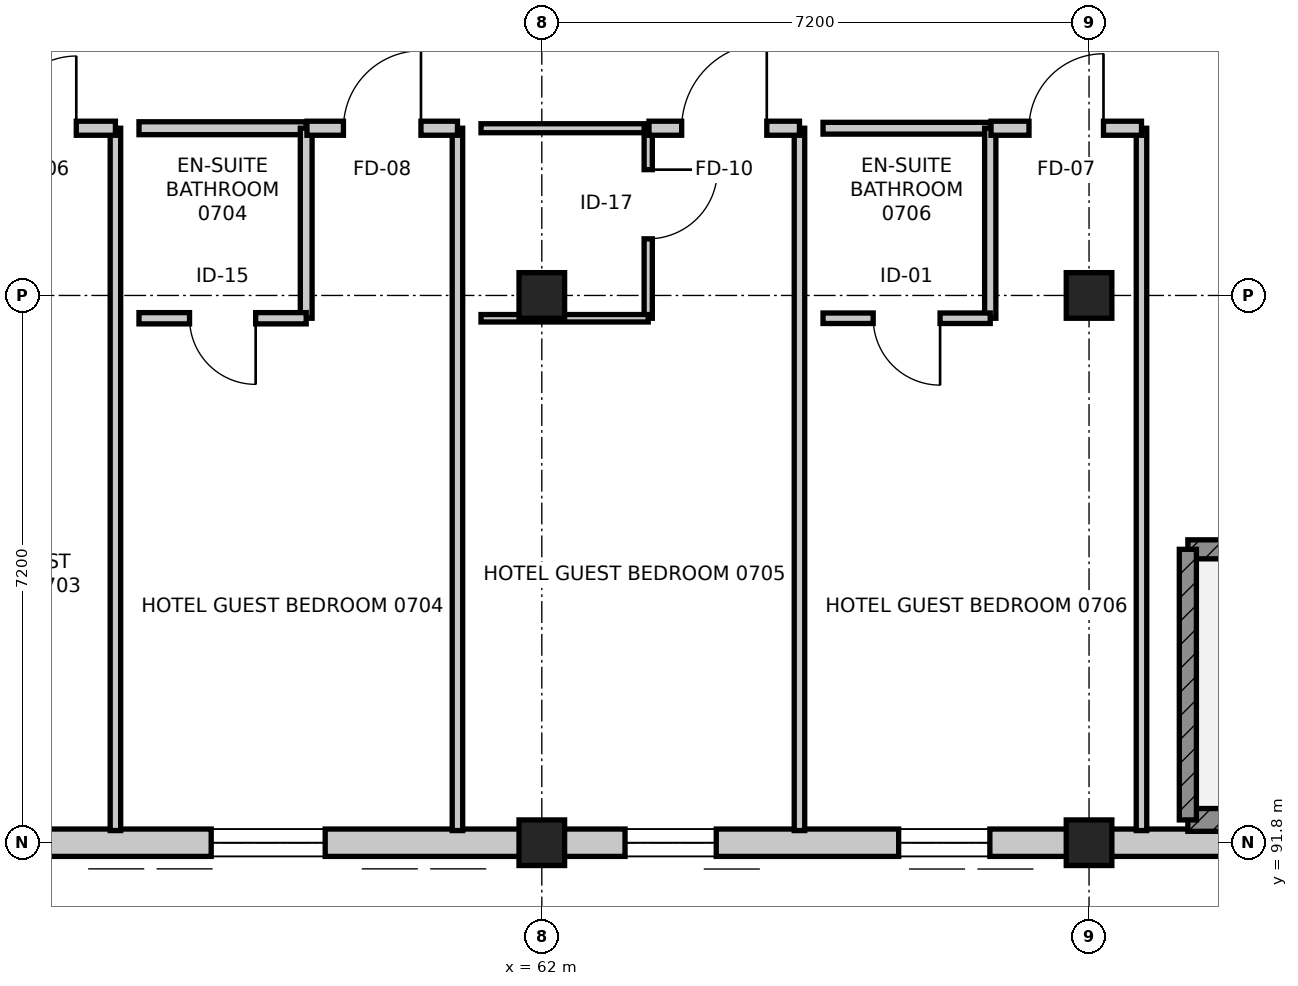
"""IFC4 building model, lengths in metres.
Left out: names, types, materials, properties, quantities, classifications, styles, units other than length and angle.
Written with IfcOpenShell. Run it as: python <this file> out.ifc"""

import sys

from ifc_helpers import new_model, si_unit, direction, frame, frame_2d, origin, origin_2d, place, context, subcontext, project, spatial, rectangle, extrude, element, fill, save


model = new_model("IFC4")
c1 = context("Model", 3, precision=1e-05, world=origin(), true_north=direction((0.0, 1.0)))
c2 = subcontext(c1, "Body", "Model", "MODEL_VIEW")
j1 = project(units=[si_unit("LENGTHUNIT", "METRE"), si_unit("PLANEANGLEUNIT", "RADIAN")], contexts=[c1])
p1 = place(None, origin())
s1 = spatial("IfcSite", under=j1, at=p1, CompositionType="ELEMENT")
p2 = place(p1, origin())
s2 = spatial("IfcBuilding", under=s1, at=p2, CompositionType="ELEMENT")
p3 = place(p2, frame((0.0, 0.0, 30.0)))
s3 = spatial("IfcBuildingStorey", under=s2, at=p3, CompositionType="ELEMENT", Elevation=30.0)
for number, where, z_axis, x_axis in (
    (1, (62.0, 91.8, 0.0), (0.0, 0.0, 1.0), (1.0, 0.0, 0.0)),
    (2, (62.0, 99.0, 0.0), (0.0, 0.0, 1.0), (1.0, 0.0, 0.0)),
    (3, (69.2, 91.8, 0.0), (0.0, 0.0, 1.0), (1.0, 0.0, 0.0)),
    (4, (69.2, 99.0, 0.0), (0.0, 0.0, 1.0), (1.0, 0.0, 0.0)),
):
    element("IfcColumn", number, at=place(p3, frame(where, z_axis=z_axis, x_axis=x_axis)), inside=s3, PredefinedType="COLUMN", context=c2, shape_type="SweptSolid", body=[
        extrude(rectangle(XDim=0.6, YDim=0.6, at=origin_2d()), origin(), (0.0, 0.0, 1.0), 3.6),
    ])
p4 = place(p3, frame((76.4, 91.8, 0.0), z_axis=(0.0, 0.0, 1.0), x_axis=(-1.0, 0.0, 0.0)))
e5 = element("IfcWall", 5, at=p4, inside=s3, PredefinedType="STANDARD", context=c2, shape_type="SweptSolid", body=[
    extrude(rectangle(XDim=7.2, YDim=0.36, at=frame_2d((3.6, 0.0))), origin(), (0.0, 0.0, 1.0), 3.36),
])
p5 = place(p4, frame((2.8, 0.0, 0.9)))
e6 = element("IfcOpeningElement", 6, at=p5, cuts=e5, PredefinedType="OPENING", context=c2, shape_type="SweptSolid", body=[
    extrude(rectangle(XDim=1.6, YDim=1.95, at=frame_2d((0.8, 0.975))), frame((0.0, 0.19, 0.0), z_axis=(0.0, -1.0, 0.0), x_axis=(1.0, 0.0, 0.0)), (0.0, 0.0, 1.0), 0.38),
])
p6 = place(p3, frame((69.2, 91.8, 0.0), z_axis=(0.0, 0.0, 1.0), x_axis=(-1.0, 0.0, 0.0)))
e7 = element("IfcWall", 7, at=p6, inside=s3, PredefinedType="STANDARD", context=c2, shape_type="SweptSolid", body=[
    extrude(rectangle(XDim=7.2, YDim=0.36, at=frame_2d((3.6, 0.0))), origin(), (0.0, 0.0, 1.0), 2.745),
])
p7 = place(p6, frame((1.305, 0.0, 0.75)))
e8 = element("IfcOpeningElement", 8, at=p7, cuts=e7, PredefinedType="OPENING", context=c2, shape_type="SweptSolid", body=[
    extrude(rectangle(XDim=1.2, YDim=1.5, at=frame_2d((0.6, 0.75))), frame((0.0, 0.19, 0.0), z_axis=(0.0, -1.0, 0.0), x_axis=(1.0, 0.0, 0.0)), (0.0, 0.0, 1.0), 0.38),
])
p8 = place(p6, frame((4.905, 0.0, 0.75)))
e9 = element("IfcOpeningElement", 9, at=p8, cuts=e7, PredefinedType="OPENING", context=c2, shape_type="SweptSolid", body=[
    extrude(rectangle(XDim=1.2, YDim=1.5, at=frame_2d((0.6, 0.75))), frame((0.0, 0.19, 0.0), z_axis=(0.0, -1.0, 0.0), x_axis=(1.0, 0.0, 0.0)), (0.0, 0.0, 1.0), 0.38),
])
p9 = place(p3, frame((62.0, 91.8, 0.0), z_axis=(0.0, 0.0, 1.0), x_axis=(-1.0, 0.0, 0.0)))
e10 = element("IfcWall", 10, at=p9, inside=s3, PredefinedType="STANDARD", context=c2, shape_type="SweptSolid", body=[
    extrude(rectangle(XDim=7.2, YDim=0.36, at=frame_2d((3.6, 0.0))), origin(), (0.0, 0.0, 1.0), 2.745),
])
p10 = place(p9, frame((2.85, 0.0, 0.75)))
e11 = element("IfcOpeningElement", 11, at=p10, cuts=e10, PredefinedType="OPENING", context=c2, shape_type="SweptSolid", body=[
    extrude(rectangle(XDim=1.5, YDim=1.5, at=frame_2d((0.75, 0.75))), frame((0.0, 0.19, 0.0), z_axis=(0.0, -1.0, 0.0), x_axis=(1.0, 0.0, 0.0)), (0.0, 0.0, 1.0), 0.38),
])
p11 = place(p3, frame((70.5, 92.1, 0.0), z_axis=(0.0, 0.0, 1.0), x_axis=(1.0, 0.0, 0.0)))
e12 = element("IfcWall", 12, at=p11, inside=s3, PredefinedType="SHEAR", context=c2, shape_type="SweptSolid", body=[
    extrude(rectangle(XDim=8.4, YDim=0.3, at=frame_2d((4.2, 0.0))), origin(), (0.0, 0.0, 1.0), 3.36),
])
p12 = place(p3, frame((78.9, 95.66, 0.0), z_axis=(0.0, 0.0, 1.0), x_axis=(-1.0, 0.0, 0.0)))
e13 = element("IfcWall", 13, at=p12, inside=s3, PredefinedType="SHEAR", context=c2, shape_type="SweptSolid", body=[
    extrude(rectangle(XDim=8.4, YDim=0.25, at=frame_2d((4.2, 0.0))), origin(), (0.0, 0.0, 1.0), 3.36),
])
p13 = place(p12, frame((0.39, 0.0, 0.0)))
e14 = element("IfcOpeningElement", 14, at=p13, cuts=e13, PredefinedType="OPENING", context=c2, shape_type="SweptSolid", body=[
    extrude(rectangle(XDim=1.1, YDim=2.1, at=frame_2d((0.55, 1.05))), frame((0.0, 0.135, 0.0), z_axis=(0.0, -1.0, 0.0), x_axis=(1.0, 0.0, 0.0)), (0.0, 0.0, 1.0), 0.27),
])
p14 = place(p3, frame((70.5, 95.66, 0.0), z_axis=(0.0, 0.0, 1.0), x_axis=(0.0, -1.0, 0.0)))
e15 = element("IfcWall", 15, at=p14, inside=s3, PredefinedType="SHEAR", context=c2, shape_type="SweptSolid", body=[
    extrude(rectangle(XDim=3.56, YDim=0.225, at=frame_2d((1.78, 0.0))), origin(), (0.0, 0.0, 1.0), 3.36),
])
p15 = place(p3, frame((56.39, 101.2, 0.0), z_axis=(0.0, 0.0, 1.0), x_axis=(0.0, -1.0, 0.0)))
e16 = element("IfcWall", 16, at=p15, inside=s3, PredefinedType="PARTITIONING", context=c2, shape_type="SweptSolid", body=[
    extrude(rectangle(XDim=9.24, YDim=0.138, at=frame_2d((4.62, 0.0))), origin(), (0.0, 0.0, 1.0), 2.745),
])
p16 = place(p3, frame((54.41, 101.2, 0.0), z_axis=(0.0, 0.0, 1.0), x_axis=(1.0, 0.0, 0.0)))
e17 = element("IfcWall", 17, at=p16, inside=s3, PredefinedType="PARTITIONING", context=c2, shape_type="SweptSolid", body=[
    extrude(rectangle(XDim=1.98, YDim=0.185, at=frame_2d((0.99, 0.0))), origin(), (0.0, 0.0, 1.0), 2.695),
])
p17 = place(p16, frame((0.515, 0.0, 0.0)))
e18 = element("IfcOpeningElement", 18, at=p17, cuts=e17, PredefinedType="OPENING", context=c2, shape_type="SweptSolid", body=[
    extrude(rectangle(XDim=0.95, YDim=2.1, at=frame_2d((0.475, 1.05))), frame((0.0, 0.103, 0.0), z_axis=(0.0, -1.0, 0.0), x_axis=(1.0, 0.0, 0.0)), (0.0, 0.0, 1.0), 0.205),
])
p18 = place(p3, frame((56.7, 101.2, 0.0), z_axis=(0.0, 0.0, 1.0), x_axis=(1.0, 0.0, 0.0)))
e19 = element("IfcWall", 19, at=p18, inside=s3, PredefinedType="PARTITIONING", context=c2, shape_type="SweptSolid", body=[
    extrude(rectangle(XDim=2.2, YDim=0.17, at=frame_2d((1.1, 0.0))), origin(), (0.0, 0.0, 1.0), 3.36),
])
p19 = place(p3, frame((58.9, 101.2, 0.0), z_axis=(0.0, 0.0, 1.0), x_axis=(0.0, -1.0, 0.0)))
e20 = element("IfcWall", 20, at=p19, inside=s3, PredefinedType="PARTITIONING", context=c2, shape_type="SweptSolid", body=[
    extrude(rectangle(XDim=2.5, YDim=0.155, at=frame_2d((1.25, 0.0))), origin(), (0.0, 0.0, 1.0), 2.745),
])
p20 = place(p3, frame((58.9, 98.7, 0.0), z_axis=(0.0, 0.0, 1.0), x_axis=(-1.0, 0.0, 0.0)))
e21 = element("IfcWall", 21, at=p20, inside=s3, PredefinedType="PARTITIONING", context=c2, shape_type="SweptSolid", body=[
    extrude(rectangle(XDim=2.2, YDim=0.148, at=frame_2d((1.1, 0.0))), origin(), (0.0, 0.0, 1.0), 3.36),
])
p21 = place(p20, frame((0.665, 0.0, 0.0)))
e22 = element("IfcOpeningElement", 22, at=p21, cuts=e21, PredefinedType="OPENING", context=c2, shape_type="SweptSolid", body=[
    extrude(rectangle(XDim=0.87, YDim=2.07, at=frame_2d((0.435, 1.035))), frame((0.0, 0.084, 0.0), z_axis=(0.0, -1.0, 0.0), x_axis=(1.0, 0.0, 0.0)), (0.0, 0.0, 1.0), 0.168),
])
p22 = place(p3, frame((60.89, 101.2, 0.0), z_axis=(0.0, 0.0, 1.0), x_axis=(0.0, -1.0, 0.0)))
e23 = element("IfcWall", 23, at=p22, inside=s3, PredefinedType="PARTITIONING", context=c2, shape_type="SweptSolid", body=[
    extrude(rectangle(XDim=9.24, YDim=0.138, at=frame_2d((4.62, 0.0))), origin(), (0.0, 0.0, 1.0), 2.745),
])
p23 = place(p3, frame((58.91, 101.2, 0.0), z_axis=(0.0, 0.0, 1.0), x_axis=(1.0, 0.0, 0.0)))
e24 = element("IfcWall", 24, at=p23, inside=s3, PredefinedType="PARTITIONING", context=c2, shape_type="SweptSolid", body=[
    extrude(rectangle(XDim=1.98, YDim=0.185, at=frame_2d((0.99, 0.0))), origin(), (0.0, 0.0, 1.0), 3.36),
])
p24 = place(p23, frame((0.48, 0.0, 0.0)))
e25 = element("IfcOpeningElement", 25, at=p24, cuts=e24, PredefinedType="OPENING", context=c2, shape_type="SweptSolid", body=[
    extrude(rectangle(XDim=1.02, YDim=2.15, at=frame_2d((0.51, 1.075))), frame((0.0, 0.103, 0.0), z_axis=(0.0, -1.0, 0.0), x_axis=(1.0, 0.0, 0.0)), (0.0, 0.0, 1.0), 0.205),
])
p25 = place(p3, frame((61.2, 101.2, 0.0), z_axis=(0.0, 0.0, 1.0), x_axis=(1.0, 0.0, 0.0)))
e26 = element("IfcWall", 26, at=p25, inside=s3, PredefinedType="PARTITIONING", context=c2, shape_type="SweptSolid", body=[
    extrude(rectangle(XDim=2.2, YDim=0.118, at=frame_2d((1.1, 0.0))), origin(), (0.0, 0.0, 1.0), 2.695),
])
p26 = place(p3, frame((63.4, 101.2, 0.0), z_axis=(0.0, 0.0, 1.0), x_axis=(0.0, -1.0, 0.0)))
e27 = element("IfcWall", 27, at=p26, inside=s3, PredefinedType="PARTITIONING", context=c2, shape_type="SweptSolid", body=[
    extrude(rectangle(XDim=2.5, YDim=0.108, at=frame_2d((1.25, 0.0))), origin(), (0.0, 0.0, 1.0), 2.745),
])
p27 = place(p26, frame((0.545, 0.0, 0.0)))
e28 = element("IfcOpeningElement", 28, at=p27, cuts=e27, PredefinedType="OPENING", context=c2, shape_type="SweptSolid", body=[
    extrude(rectangle(XDim=0.91, YDim=2.11, at=frame_2d((0.455, 1.055))), frame((0.0, 0.064, 0.0), z_axis=(0.0, -1.0, 0.0), x_axis=(1.0, 0.0, 0.0)), (0.0, 0.0, 1.0), 0.128),
])
p28 = place(p3, frame((63.4, 98.7, 0.0), z_axis=(0.0, 0.0, 1.0), x_axis=(-1.0, 0.0, 0.0)))
e29 = element("IfcWall", 29, at=p28, inside=s3, PredefinedType="PARTITIONING", context=c2, shape_type="SweptSolid", body=[
    extrude(rectangle(XDim=2.2, YDim=0.098, at=frame_2d((1.1, 0.0))), origin(), (0.0, 0.0, 1.0), 2.695),
])
p29 = place(p3, frame((65.39, 101.2, 0.0), z_axis=(0.0, 0.0, 1.0), x_axis=(0.0, -1.0, 0.0)))
e30 = element("IfcWall", 30, at=p29, inside=s3, PredefinedType="PARTITIONING", context=c2, shape_type="SweptSolid", body=[
    extrude(rectangle(XDim=9.24, YDim=0.138, at=frame_2d((4.62, 0.0))), origin(), (0.0, 0.0, 1.0), 2.745),
])
p30 = place(p3, frame((63.41, 101.2, 0.0), z_axis=(0.0, 0.0, 1.0), x_axis=(1.0, 0.0, 0.0)))
e31 = element("IfcWall", 31, at=p30, inside=s3, PredefinedType="PARTITIONING", context=c2, shape_type="SweptSolid", body=[
    extrude(rectangle(XDim=1.98, YDim=0.185, at=frame_2d((0.99, 0.0))), origin(), (0.0, 0.0, 1.0), 3.36),
])
p31 = place(p30, frame((0.43, 0.0, 0.0)))
e32 = element("IfcOpeningElement", 32, at=p31, cuts=e31, PredefinedType="OPENING", context=c2, shape_type="SweptSolid", body=[
    extrude(rectangle(XDim=1.12, YDim=2.2, at=frame_2d((0.56, 1.1))), frame((0.0, 0.103, 0.0), z_axis=(0.0, -1.0, 0.0), x_axis=(1.0, 0.0, 0.0)), (0.0, 0.0, 1.0), 0.205),
])
p32 = place(p3, frame((65.7, 101.2, 0.0), z_axis=(0.0, 0.0, 1.0), x_axis=(1.0, 0.0, 0.0)))
e33 = element("IfcWall", 33, at=p32, inside=s3, PredefinedType="PARTITIONING", context=c2, shape_type="SweptSolid", body=[
    extrude(rectangle(XDim=2.2, YDim=0.155, at=frame_2d((1.1, 0.0))), origin(), (0.0, 0.0, 1.0), 3.36),
])
p33 = place(p3, frame((67.9, 101.2, 0.0), z_axis=(0.0, 0.0, 1.0), x_axis=(0.0, -1.0, 0.0)))
e34 = element("IfcWall", 34, at=p33, inside=s3, PredefinedType="PARTITIONING", context=c2, shape_type="SweptSolid", body=[
    extrude(rectangle(XDim=2.5, YDim=0.148, at=frame_2d((1.25, 0.0))), origin(), (0.0, 0.0, 1.0), 2.745),
])
p34 = place(p3, frame((67.9, 98.7, 0.0), z_axis=(0.0, 0.0, 1.0), x_axis=(-1.0, 0.0, 0.0)))
e35 = element("IfcWall", 35, at=p34, inside=s3, PredefinedType="PARTITIONING", context=c2, shape_type="SweptSolid", body=[
    extrude(rectangle(XDim=2.2, YDim=0.138, at=frame_2d((1.1, 0.0))), origin(), (0.0, 0.0, 1.0), 3.36),
])
p35 = place(p34, frame((0.66, 0.0, 0.0)))
e36 = element("IfcOpeningElement", 36, at=p35, cuts=e35, PredefinedType="OPENING", context=c2, shape_type="SweptSolid", body=[
    extrude(rectangle(XDim=0.88, YDim=2.06, at=frame_2d((0.44, 1.03))), frame((0.0, 0.079, 0.0), z_axis=(0.0, -1.0, 0.0), x_axis=(1.0, 0.0, 0.0)), (0.0, 0.0, 1.0), 0.158),
])
p36 = place(p3, frame((69.89, 101.2, 0.0), z_axis=(0.0, 0.0, 1.0), x_axis=(0.0, -1.0, 0.0)))
e37 = element("IfcWall", 37, at=p36, inside=s3, PredefinedType="PARTITIONING", context=c2, shape_type="SweptSolid", body=[
    extrude(rectangle(XDim=9.24, YDim=0.138, at=frame_2d((4.62, 0.0))), origin(), (0.0, 0.0, 1.0), 2.745),
])
p37 = place(p3, frame((67.91, 101.2, 0.0), z_axis=(0.0, 0.0, 1.0), x_axis=(1.0, 0.0, 0.0)))
e38 = element("IfcWall", 38, at=p37, inside=s3, PredefinedType="PARTITIONING", context=c2, shape_type="SweptSolid", body=[
    extrude(rectangle(XDim=1.98, YDim=0.185, at=frame_2d((0.99, 0.0))), origin(), (0.0, 0.0, 1.0), 2.695),
])
p38 = place(p37, frame((0.5, 0.0, 0.0)))
e39 = element("IfcOpeningElement", 39, at=p38, cuts=e38, PredefinedType="OPENING", context=c2, shape_type="SweptSolid", body=[
    extrude(rectangle(XDim=0.98, YDim=2.15, at=frame_2d((0.49, 1.075))), frame((0.0, 0.103, 0.0), z_axis=(0.0, -1.0, 0.0), x_axis=(1.0, 0.0, 0.0)), (0.0, 0.0, 1.0), 0.205),
])
p39 = place(p7, origin())
e40 = element("IfcWindow", 40, at=p39, inside=s3, PartitioningType="SINGLE_PANEL", PredefinedType="WINDOW", context=c2, shape_type="SweptSolid", body=[
    extrude(rectangle(XDim=1.2, YDim=1.5, at=frame_2d((0.6, 0.75))), frame((0.0, 0.03, 0.0), z_axis=(0.0, -1.0, 0.0), x_axis=(1.0, 0.0, 0.0)), (0.0, 0.0, 1.0), 0.06),
])
fill(e8, e40)
p40 = place(p10, origin())
e41 = element("IfcWindow", 41, at=p40, inside=s3, PartitioningType="SINGLE_PANEL", PredefinedType="WINDOW", context=c2, shape_type="SweptSolid", body=[
    extrude(rectangle(XDim=1.5, YDim=1.5, at=frame_2d((0.75, 0.75))), frame((0.0, 0.03, 0.0), z_axis=(0.0, -1.0, 0.0), x_axis=(1.0, 0.0, 0.0)), (0.0, 0.0, 1.0), 0.06),
])
fill(e11, e41)
p41 = place(p17, origin())
e42 = element("IfcDoor", 42, at=p41, inside=s3, OperationType="SINGLE_SWING_RIGHT", PredefinedType="DOOR", context=c2, shape_type="SweptSolid", body=[
    extrude(rectangle(XDim=0.95, YDim=2.1, at=frame_2d((0.475, 1.05))), frame((0.0, 0.025, 0.0), z_axis=(0.0, -1.0, 0.0), x_axis=(1.0, 0.0, 0.0)), (0.0, 0.0, 1.0), 0.05),
])
fill(e18, e42)
p42 = place(p21, origin())
e43 = element("IfcDoor", 43, at=p42, inside=s3, OperationType="SINGLE_SWING_LEFT", PredefinedType="DOOR", context=c2, shape_type="SweptSolid", body=[
    extrude(rectangle(XDim=0.87, YDim=2.07, at=frame_2d((0.435, 1.035))), frame((0.0, 0.025, 0.0), z_axis=(0.0, -1.0, 0.0), x_axis=(1.0, 0.0, 0.0)), (0.0, 0.0, 1.0), 0.05),
])
fill(e22, e43)
p43 = place(p24, origin())
e44 = element("IfcDoor", 44, at=p43, inside=s3, OperationType="SINGLE_SWING_RIGHT", PredefinedType="DOOR", context=c2, shape_type="SweptSolid", body=[
    extrude(rectangle(XDim=1.02, YDim=2.15, at=frame_2d((0.51, 1.075))), frame((0.0, 0.025, 0.0), z_axis=(0.0, -1.0, 0.0), x_axis=(1.0, 0.0, 0.0)), (0.0, 0.0, 1.0), 0.05),
])
fill(e25, e44)
p44 = place(p27, origin())
e45 = element("IfcDoor", 45, at=p44, inside=s3, OperationType="SINGLE_SWING_LEFT", PredefinedType="DOOR", context=c2, shape_type="SweptSolid", body=[
    extrude(rectangle(XDim=0.91, YDim=2.11, at=frame_2d((0.455, 1.055))), frame((0.0, 0.025, 0.0), z_axis=(0.0, -1.0, 0.0), x_axis=(1.0, 0.0, 0.0)), (0.0, 0.0, 1.0), 0.05),
])
fill(e28, e45)
p45 = place(p31, origin())
e46 = element("IfcDoor", 46, at=p45, inside=s3, OperationType="SINGLE_SWING_RIGHT", PredefinedType="DOOR", context=c2, shape_type="SweptSolid", body=[
    extrude(rectangle(XDim=1.12, YDim=2.2, at=frame_2d((0.56, 1.1))), frame((0.0, 0.025, 0.0), z_axis=(0.0, -1.0, 0.0), x_axis=(1.0, 0.0, 0.0)), (0.0, 0.0, 1.0), 0.05),
])
fill(e32, e46)
p46 = place(p35, origin())
e47 = element("IfcDoor", 47, at=p46, inside=s3, OperationType="SINGLE_SWING_LEFT", PredefinedType="DOOR", context=c2, shape_type="SweptSolid", body=[
    extrude(rectangle(XDim=0.88, YDim=2.06, at=frame_2d((0.44, 1.03))), frame((0.0, 0.025, 0.0), z_axis=(0.0, -1.0, 0.0), x_axis=(1.0, 0.0, 0.0)), (0.0, 0.0, 1.0), 0.05),
])
fill(e36, e47)
p47 = place(p38, origin())
e48 = element("IfcDoor", 48, at=p47, inside=s3, OperationType="SINGLE_SWING_RIGHT", PredefinedType="DOOR", context=c2, shape_type="SweptSolid", body=[
    extrude(rectangle(XDim=0.98, YDim=2.15, at=frame_2d((0.49, 1.075))), frame((0.0, 0.025, 0.0), z_axis=(0.0, -1.0, 0.0), x_axis=(1.0, 0.0, 0.0)), (0.0, 0.0, 1.0), 0.05),
])
fill(e39, e48)
p48 = place(p8, origin())
e49 = element("IfcWindow", 49, at=p48, inside=s3, PartitioningType="SINGLE_PANEL", PredefinedType="WINDOW", context=c2, shape_type="SweptSolid", body=[
    extrude(rectangle(XDim=1.2, YDim=1.5, at=frame_2d((0.6, 0.75))), frame((0.0, 0.03, 0.0), z_axis=(0.0, -1.0, 0.0), x_axis=(1.0, 0.0, 0.0)), (0.0, 0.0, 1.0), 0.06),
])
fill(e9, e49)
save(model, sys.argv[1])
